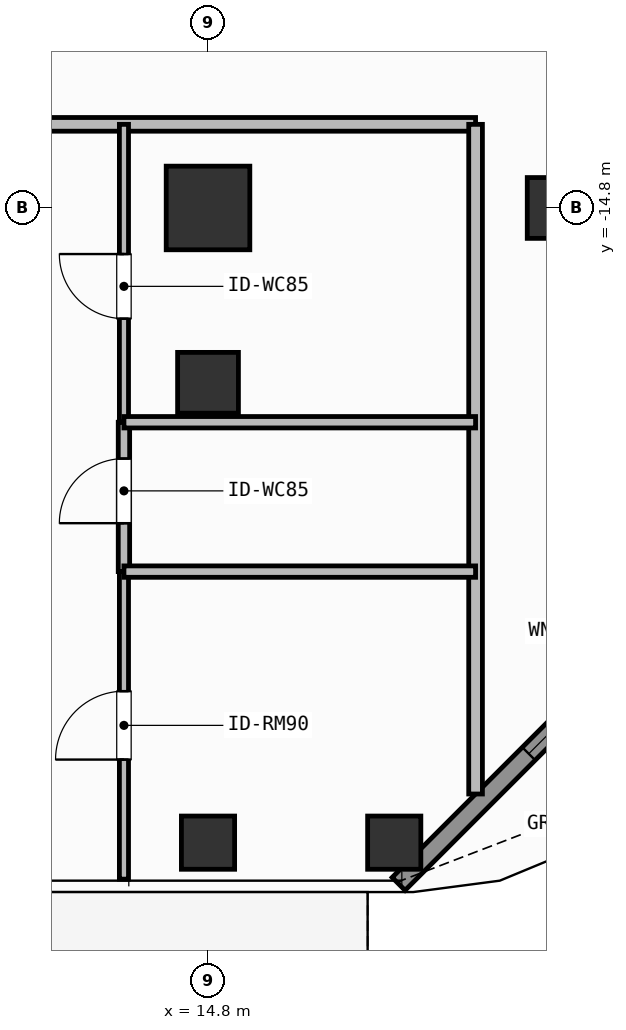
"""IFC4 building model, lengths in metres.
Left out: names, types, materials, properties, quantities, classifications, styles, units other than length and angle.
Written with IfcOpenShell. Run it as: python <this file> out.ifc"""

import sys

from ifc_helpers import new_model, si_unit, direction, frame, frame_2d, origin, origin_2d, place, context, subcontext, project, spatial, rectangle, hollow_rectangle, extrude, element, fill, save


model = new_model("IFC4")
c1 = context("Model", 3, precision=1e-05, world=origin(), true_north=direction((0.0, 1.0)))
c2 = subcontext(c1, "Body", "Model", "MODEL_VIEW")
j1 = project(units=[si_unit("LENGTHUNIT", "METRE"), si_unit("PLANEANGLEUNIT", "RADIAN")], contexts=[c1])
p1 = place(None, origin())
s1 = spatial("IfcSite", under=j1, at=p1, CompositionType="ELEMENT")
p2 = place(p1, origin())
s2 = spatial("IfcBuilding", under=s1, at=p2, CompositionType="ELEMENT")
p3 = place(p2, frame((0.0, 0.0, 168.0)))
s3 = spatial("IfcBuildingStorey", under=s2, at=p3, CompositionType="ELEMENT", Elevation=168.0)
p4 = place(p3, frame((14.8, -14.8, 0.0), z_axis=(0.0, 0.0, 1.0), x_axis=(1.0, 0.0, 0.0)))
e1 = element("IfcColumn", 1, at=p4, inside=s3, PredefinedType="COLUMN", context=c2, shape_type="SweptSolid", body=[
    extrude(rectangle(XDim=1.1, YDim=1.1, at=origin_2d()), origin(), (0.0, 0.0, 1.0), 3.9),
])
for number, where, z_axis, x_axis in (
    (2, (19.4, -14.8, 0.0), (0.0, 0.0, 1.0), (1.0, 0.0, 0.0)),
    (3, (14.8, -17.1, 0.0), (0.0, 0.0, 1.0), (1.0, 0.0, 0.0)),
):
    element("IfcColumn", number, at=place(p3, frame(where, z_axis=z_axis, x_axis=x_axis)), inside=s3, PredefinedType="COLUMN", context=c2, shape_type="SweptSolid", body=[
        extrude(hollow_rectangle(XDim=0.8, YDim=0.8, WallThickness=0.036, at=origin_2d()), origin(), (0.0, 0.0, 1.0), 3.9),
    ])
for number, where, z_axis, x_axis in (
    (4, (17.25, -23.15, 0.0), (0.0, 0.0, 1.0), (1.0, 0.0, 0.0)),
    (5, (14.8, -23.15, 0.0), (0.0, 0.0, 1.0), (1.0, 0.0, 0.0)),
):
    element("IfcColumn", number, at=place(p3, frame(where, z_axis=z_axis, x_axis=x_axis)), inside=s3, PredefinedType="COLUMN", context=c2, shape_type="SweptSolid", body=[
        extrude(hollow_rectangle(XDim=0.7, YDim=0.7, WallThickness=0.032, at=origin_2d()), origin(), (0.0, 0.0, 1.0), 3.9),
    ])
p5 = place(p3, frame((21.792, -19.208, 0.0), z_axis=(0.0, 0.0, 1.0), x_axis=(-0.707106781187, -0.707106781187, 0.0)))
e6 = element("IfcWall", 6, at=p5, inside=s3, PredefinedType="SOLIDWALL", context=c2, shape_type="SweptSolid", body=[
    extrude(rectangle(XDim=6.343, YDim=0.24, at=frame_2d((3.171, 0.0))), origin(), (0.0, 0.0, 1.0), 3.68),
])
p6 = place(p5, frame((2.421, 0.0, 0.8)))
e7 = element("IfcOpeningElement", 7, at=p6, cuts=e6, PredefinedType="OPENING", context=c2, shape_type="SweptSolid", body=[
    extrude(rectangle(XDim=1.5, YDim=1.85, at=frame_2d((0.75, 0.925))), frame((0.0, 0.13, 0.0), z_axis=(0.0, -1.0, 0.0), x_axis=(1.0, 0.0, 0.0)), (0.0, 0.0, 1.0), 0.26),
])
p7 = place(p3, frame((6.754, -13.7, 0.0), z_axis=(0.0, 0.0, 1.0), x_axis=(1.0, 0.0, 0.0)))
e8 = element("IfcWall", 8, at=p7, inside=s3, PredefinedType="PARTITIONING", context=c2, shape_type="SweptSolid", body=[
    extrude(rectangle(XDim=11.566, YDim=0.18, at=frame_2d((5.783, 0.0))), origin(), (0.0, 0.0, 1.0), 3.68),
])
p8 = place(p7, frame((4.833, 0.0, 0.0)))
e9 = element("IfcOpeningElement", 9, at=p8, cuts=e8, PredefinedType="OPENING", context=c2, shape_type="SweptSolid", body=[
    extrude(rectangle(XDim=1.0, YDim=2.2, at=frame_2d((0.5, 1.1))), frame((0.0, 0.1, 0.0), z_axis=(0.0, -1.0, 0.0), x_axis=(1.0, 0.0, 0.0)), (0.0, 0.0, 1.0), 0.2),
])
p9 = place(p3, frame((13.694, -19.584, 0.0), z_axis=(0.0, 0.0, 1.0), x_axis=(0.0, 1.0, 0.0)))
e10 = element("IfcWall", 10, at=p9, inside=s3, PredefinedType="PARTITIONING", context=c2, shape_type="SweptSolid", body=[
    extrude(rectangle(XDim=1.965, YDim=0.15, at=frame_2d((0.982, 0.0))), origin(), (0.0, 0.0, 1.0), 3.68),
])
p10 = place(p9, frame((0.637, 0.0, 0.0)))
e11 = element("IfcOpeningElement", 11, at=p10, cuts=e10, PredefinedType="OPENING", context=c2, shape_type="SweptSolid", body=[
    extrude(rectangle(XDim=0.85, YDim=2.1, at=frame_2d((0.425, 1.05))), frame((0.0, 0.085, 0.0), z_axis=(0.0, -1.0, 0.0), x_axis=(1.0, 0.0, 0.0)), (0.0, 0.0, 1.0), 0.17),
])
p11 = place(p3, frame((13.694, -17.619, 0.0), z_axis=(0.0, 0.0, 1.0), x_axis=(0.0, 1.0, 0.0)))
e12 = element("IfcWall", 12, at=p11, inside=s3, PredefinedType="PARTITIONING", context=c2, shape_type="SweptSolid", body=[
    extrude(rectangle(XDim=3.919, YDim=0.12, at=frame_2d((1.959, 0.0))), origin(), (0.0, 0.0, 1.0), 3.68),
])
p12 = place(p11, frame((1.363, 0.0, 0.0)))
e13 = element("IfcOpeningElement", 13, at=p12, cuts=e12, PredefinedType="OPENING", context=c2, shape_type="SweptSolid", body=[
    extrude(rectangle(XDim=0.85, YDim=2.1, at=frame_2d((0.425, 1.05))), frame((0.0, 0.07, 0.0), z_axis=(0.0, -1.0, 0.0), x_axis=(1.0, 0.0, 0.0)), (0.0, 0.0, 1.0), 0.14),
])
p13 = place(p3, frame((13.694, -23.63, 0.0), z_axis=(0.0, 0.0, 1.0), x_axis=(0.0, 1.0, 0.0)))
e14 = element("IfcWall", 14, at=p13, inside=s3, PredefinedType="PARTITIONING", context=c2, shape_type="SweptSolid", body=[
    extrude(rectangle(XDim=4.046, YDim=0.12, at=frame_2d((2.023, 0.0))), origin(), (0.0, 0.0, 1.0), 3.68),
])
p14 = place(p13, frame((1.573, 0.0, 0.0)))
e15 = element("IfcOpeningElement", 15, at=p14, cuts=e14, PredefinedType="OPENING", context=c2, shape_type="SweptSolid", body=[
    extrude(rectangle(XDim=0.9, YDim=2.1, at=frame_2d((0.45, 1.05))), frame((0.0, 0.07, 0.0), z_axis=(0.0, -1.0, 0.0), x_axis=(1.0, 0.0, 0.0)), (0.0, 0.0, 1.0), 0.14),
])
p15 = place(p3, frame((18.32, -22.51, 0.0), z_axis=(0.0, 0.0, 1.0), x_axis=(0.0, 1.0, 0.0)))
e16 = element("IfcWall", 16, at=p15, inside=s3, PredefinedType="PARTITIONING", context=c2, shape_type="SweptSolid", body=[
    extrude(rectangle(XDim=8.81, YDim=0.18, at=frame_2d((4.405, 0.0))), origin(), (0.0, 0.0, 1.0), 3.68),
])
for number, where, z_axis, x_axis in (
    (17, (13.694, -17.619, 0.0), (0.0, 0.0, 1.0), (1.0, 0.0, 0.0)),
    (18, (13.694, -19.584, 0.0), (0.0, 0.0, 1.0), (1.0, 0.0, 0.0)),
):
    element("IfcWall", number, at=place(p3, frame(where, z_axis=z_axis, x_axis=x_axis)), inside=s3, PredefinedType="PARTITIONING", context=c2, shape_type="SweptSolid", body=[
        extrude(rectangle(XDim=4.626, YDim=0.15, at=frame_2d((2.313, 0.0))), origin(), (0.0, 0.0, 1.0), 3.68),
    ])
p16 = place(p6, origin())
e19 = element("IfcWindow", 19, at=p16, inside=s3, PartitioningType="SINGLE_PANEL", PredefinedType="WINDOW", context=c2, shape_type="SweptSolid", body=[
    extrude(rectangle(XDim=1.5, YDim=1.85, at=frame_2d((0.75, 0.925))), frame((0.0, 0.03, 0.0), z_axis=(0.0, -1.0, 0.0), x_axis=(1.0, 0.0, 0.0)), (0.0, 0.0, 1.0), 0.06),
])
fill(e7, e19)
p17 = place(p10, origin())
e20 = element("IfcDoor", 20, at=p17, inside=s3, OperationType="SINGLE_SWING_LEFT", PredefinedType="DOOR", context=c2, shape_type="SweptSolid", body=[
    extrude(rectangle(XDim=0.85, YDim=2.1, at=frame_2d((0.425, 1.05))), frame((0.0, 0.025, 0.0), z_axis=(0.0, -1.0, 0.0), x_axis=(1.0, 0.0, 0.0)), (0.0, 0.0, 1.0), 0.05),
])
fill(e11, e20)
p18 = place(p12, origin())
e21 = element("IfcDoor", 21, at=p18, inside=s3, OperationType="SINGLE_SWING_RIGHT", PredefinedType="DOOR", context=c2, shape_type="SweptSolid", body=[
    extrude(rectangle(XDim=0.85, YDim=2.1, at=frame_2d((0.425, 1.05))), frame((0.0, 0.025, 0.0), z_axis=(0.0, -1.0, 0.0), x_axis=(1.0, 0.0, 0.0)), (0.0, 0.0, 1.0), 0.05),
])
fill(e13, e21)
p19 = place(p14, origin())
e22 = element("IfcDoor", 22, at=p19, inside=s3, OperationType="SINGLE_SWING_LEFT", PredefinedType="DOOR", context=c2, shape_type="SweptSolid", body=[
    extrude(rectangle(XDim=0.9, YDim=2.1, at=frame_2d((0.45, 1.05))), frame((0.0, 0.025, 0.0), z_axis=(0.0, -1.0, 0.0), x_axis=(1.0, 0.0, 0.0)), (0.0, 0.0, 1.0), 0.05),
])
fill(e15, e22)
save(model, sys.argv[1])
